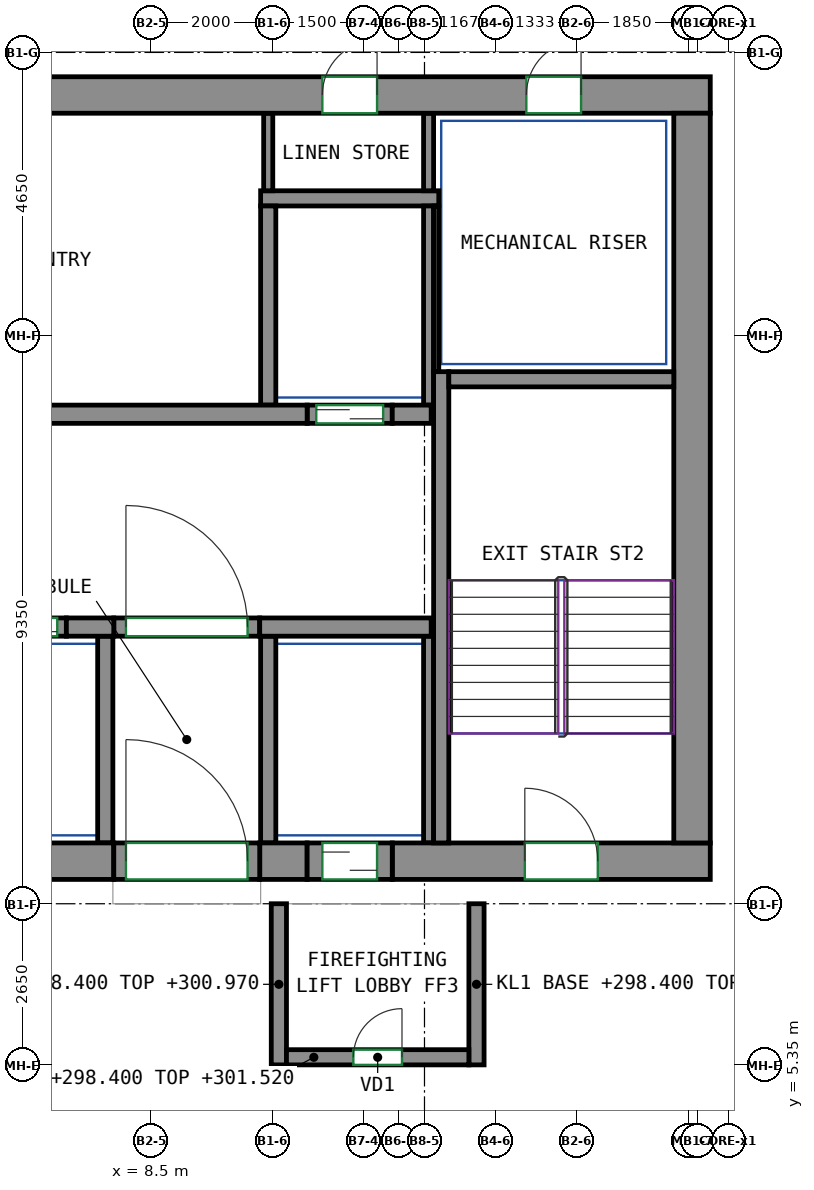
"""IFC4 building model, lengths in metres.
Left out: names, types, materials, properties, quantities, classifications, styles, units other than length and angle.
Written with IfcOpenShell. Run it as: python <this file> out.ifc"""

import sys

from ifc_helpers import new_model, si_unit, direction, frame, frame_2d, origin, place, context, subcontext, project, spatial, rectangle, extrude, source, transform, mapped, element, fill, save


model = new_model("IFC4")
c1 = context("Model", 3, precision=1e-05, world=origin(), true_north=direction((0.0, 1.0)))
c2 = subcontext(c1, "Body", "Model", "MODEL_VIEW")
j1 = project(units=[si_unit("LENGTHUNIT", "METRE"), si_unit("PLANEANGLEUNIT", "RADIAN")], contexts=[c1])
p1 = place(None, origin())
s1 = spatial("IfcSite", under=j1, at=p1, CompositionType="ELEMENT")
p2 = place(p1, origin())
s2 = spatial("IfcBuilding", under=s1, at=p2, CompositionType="ELEMENT")
p3 = place(p2, frame((0.0, 0.0, 298.4)))
s3 = spatial("IfcBuildingStorey", under=s2, at=p3, CompositionType="ELEMENT", Elevation=298.4)
m1 = source(origin(), c2, "Body", "SweptSolid", [
    extrude(rectangle(XDim=14.18, YDim=0.6, at=frame_2d((7.09, 0.0))), origin(), (0.0, 0.0, 1.0), 3.12),
])
p4 = place(p3, frame((-6.29, 8.7, 0.0), z_axis=(0.0, 0.0, 1.0), x_axis=(1.0, 0.0, 0.0)))
e1 = element("IfcWall", 1, at=p4, inside=s3, PredefinedType="SHEAR", context=c2, shape_type="MappedRepresentation", body=[
    mapped(m1, transform((0.0, 0.0, 0.0))),
])
m2 = source(origin(), c2, "Body", "SweptSolid", [
    extrude(rectangle(XDim=0.78, YDim=0.6, at=frame_2d((0.39, 0.0))), origin(), (0.0, 0.0, 1.0), 3.12),
])
p5 = place(p3, frame((10.29, 8.7, 0.0), z_axis=(0.0, 0.0, 1.0), x_axis=(1.0, 0.0, 0.0)))
e2 = element("IfcWall", 2, at=p5, inside=s3, PredefinedType="SHEAR", context=c2, shape_type="MappedRepresentation", body=[
    mapped(m2, transform((0.0, 0.0, 0.0))),
])
m3 = source(origin(), c2, "Body", "SweptSolid", [
    extrude(rectangle(XDim=5.23, YDim=0.6, at=frame_2d((2.615, 0.0))), origin(), (0.0, 0.0, 1.0), 3.12),
])
p6 = place(p3, frame((12.47, 8.7, 0.0), z_axis=(0.0, 0.0, 1.0), x_axis=(1.0, 0.0, 0.0)))
e3 = element("IfcWall", 3, at=p6, inside=s3, PredefinedType="SHEAR", context=c2, shape_type="MappedRepresentation", body=[
    mapped(m3, transform((0.0, 0.0, 0.0))),
])
p7 = place(p6, frame((2.18, 0.0, 0.0)))
e4 = element("IfcOpeningElement", 4, at=p7, cuts=e3, PredefinedType="OPENING", context=c2, shape_type="SweptSolid", body=[
    extrude(rectangle(XDim=1.2, YDim=2.1, at=frame_2d((0.6, 1.05))), frame((0.0, 0.31, 0.0), z_axis=(0.0, -1.0, 0.0), x_axis=(1.0, 0.0, 0.0)), (0.0, 0.0, 1.0), 0.62),
])
m4 = source(origin(), c2, "Body", "SweptSolid", [
    extrude(rectangle(XDim=33.3, YDim=0.6, at=frame_2d((16.65, 0.0))), origin(), (0.0, 0.0, 1.0), 3.12),
])
p8 = place(p3, frame((-15.6, 21.3, 0.0), z_axis=(0.0, 0.0, 1.0), x_axis=(1.0, 0.0, 0.0)))
e5 = element("IfcWall", 5, at=p8, inside=s3, PredefinedType="SHEAR", context=c2, shape_type="MappedRepresentation", body=[
    mapped(m4, transform((0.0, 0.0, 0.0))),
])
p9 = place(p8, frame((5.708, 0.0, 0.0)))
e6 = element("IfcOpeningElement", 6, at=p9, cuts=e5, PredefinedType="OPENING", context=c2, shape_type="SweptSolid", body=[
    extrude(rectangle(XDim=0.9, YDim=2.1, at=frame_2d((0.45, 1.05))), frame((0.0, 0.31, 0.0), z_axis=(0.0, -1.0, 0.0), x_axis=(1.0, 0.0, 0.0)), (0.0, 0.0, 1.0), 0.62),
])
p10 = place(p8, frame((10.773, 0.0, 0.0)))
e7 = element("IfcOpeningElement", 7, at=p10, cuts=e5, PredefinedType="OPENING", context=c2, shape_type="SweptSolid", body=[
    extrude(rectangle(XDim=0.9, YDim=2.1, at=frame_2d((0.45, 1.05))), frame((0.0, 0.31, 0.0), z_axis=(0.0, -1.0, 0.0), x_axis=(1.0, 0.0, 0.0)), (0.0, 0.0, 1.0), 0.62),
])
p11 = place(p8, frame((15.838, 0.0, 0.0)))
e8 = element("IfcOpeningElement", 8, at=p11, cuts=e5, PredefinedType="OPENING", context=c2, shape_type="SweptSolid", body=[
    extrude(rectangle(XDim=0.9, YDim=2.1, at=frame_2d((0.45, 1.05))), frame((0.0, 0.31, 0.0), z_axis=(0.0, -1.0, 0.0), x_axis=(1.0, 0.0, 0.0)), (0.0, 0.0, 1.0), 0.62),
])
p12 = place(p8, frame((21.493, 0.0, 0.0)))
e9 = element("IfcOpeningElement", 9, at=p12, cuts=e5, PredefinedType="OPENING", context=c2, shape_type="SweptSolid", body=[
    extrude(rectangle(XDim=0.9, YDim=2.1, at=frame_2d((0.45, 1.05))), frame((0.0, 0.31, 0.0), z_axis=(0.0, -1.0, 0.0), x_axis=(1.0, 0.0, 0.0)), (0.0, 0.0, 1.0), 0.62),
])
p13 = place(p8, frame((26.92, 0.0, 0.0)))
e10 = element("IfcOpeningElement", 10, at=p13, cuts=e5, PredefinedType="OPENING", context=c2, shape_type="SweptSolid", body=[
    extrude(rectangle(XDim=0.9, YDim=2.1, at=frame_2d((0.45, 1.05))), frame((0.0, 0.31, 0.0), z_axis=(0.0, -1.0, 0.0), x_axis=(1.0, 0.0, 0.0)), (0.0, 0.0, 1.0), 0.62),
])
p14 = place(p8, frame((2.125, 0.0, 0.0)))
e11 = element("IfcOpeningElement", 11, at=p14, cuts=e5, PredefinedType="OPENING", context=c2, shape_type="SweptSolid", body=[
    extrude(rectangle(XDim=0.9, YDim=2.1, at=frame_2d((0.45, 1.05))), frame((0.0, 0.31, 0.0), z_axis=(0.0, -1.0, 0.0), x_axis=(1.0, 0.0, 0.0)), (0.0, 0.0, 1.0), 0.62),
])
p15 = place(p8, frame((30.275, 0.0, 0.0)))
e12 = element("IfcOpeningElement", 12, at=p15, cuts=e5, PredefinedType="OPENING", context=c2, shape_type="SweptSolid", body=[
    extrude(rectangle(XDim=0.9, YDim=2.1, at=frame_2d((0.45, 1.05))), frame((0.0, 0.31, 0.0), z_axis=(0.0, -1.0, 0.0), x_axis=(1.0, 0.0, 0.0)), (0.0, 0.0, 1.0), 0.62),
])
m5 = source(origin(), c2, "Body", "SweptSolid", [
    extrude(rectangle(XDim=12.0, YDim=0.6, at=frame_2d((6.0, 0.0))), origin(), (0.0, 0.0, 1.0), 3.12),
])
p16 = place(p3, frame((17.4, 9.0, 0.0), z_axis=(0.0, 0.0, 1.0), x_axis=(0.0, 1.0, 0.0)))
e13 = element("IfcWall", 13, at=p16, inside=s3, PredefinedType="SHEAR", context=c2, shape_type="MappedRepresentation", body=[
    mapped(m5, transform((0.0, 0.0, 0.0))),
])
m6 = source(origin(), c2, "Body", "SweptSolid", [
    extrude(rectangle(XDim=7.75, YDim=0.25, at=frame_2d((3.875, 0.0))), origin(), (0.0, 0.0, 1.0), 3.12),
])
p17 = place(p3, frame((13.275, 9.0, 0.0), z_axis=(0.0, 0.0, 1.0), x_axis=(0.0, 1.0, 0.0)))
e14 = element("IfcWall", 14, at=p17, inside=s3, PredefinedType="SHEAR", context=c2, shape_type="MappedRepresentation", body=[
    mapped(m6, transform((0.0, 0.0, 0.0))),
])
m7 = source(origin(), c2, "Body", "SweptSolid", [
    extrude(rectangle(XDim=3.7, YDim=0.25, at=frame_2d((1.85, 0.0))), origin(), (0.0, 0.0, 1.0), 3.12),
])
p18 = place(p3, frame((13.4, 16.625, 0.0), z_axis=(0.0, 0.0, 1.0), x_axis=(1.0, 0.0, 0.0)))
e15 = element("IfcWall", 15, at=p18, inside=s3, PredefinedType="SHEAR", context=c2, shape_type="MappedRepresentation", body=[
    mapped(m7, transform((0.0, 0.0, 0.0))),
])
m8 = source(origin(), c2, "Body", "SweptSolid", [
    extrude(rectangle(XDim=0.78, YDim=0.3, at=frame_2d((0.39, 0.0))), origin(), (0.0, 0.0, 1.0), 3.12),
])
p19 = place(p3, frame((7.11, 12.55, 0.0), z_axis=(0.0, 0.0, 1.0), x_axis=(1.0, 0.0, 0.0)))
e16 = element("IfcWall", 16, at=p19, inside=s3, PredefinedType="SHEAR", context=c2, shape_type="MappedRepresentation", body=[
    mapped(m8, transform((0.0, 0.0, 0.0))),
])
m9 = source(origin(), c2, "Body", "SweptSolid", [
    extrude(rectangle(XDim=2.82, YDim=0.3, at=frame_2d((1.41, 0.0))), origin(), (0.0, 0.0, 1.0), 3.12),
])
p20 = place(p3, frame((10.29, 12.55, 0.0), z_axis=(0.0, 0.0, 1.0), x_axis=(1.0, 0.0, 0.0)))
e17 = element("IfcWall", 17, at=p20, inside=s3, PredefinedType="SHEAR", context=c2, shape_type="MappedRepresentation", body=[
    mapped(m9, transform((0.0, 0.0, 0.0))),
])
m10 = source(origin(), c2, "Body", "SweptSolid", [
    extrude(rectangle(XDim=22.08, YDim=0.3, at=frame_2d((11.04, 0.0))), origin(), (0.0, 0.0, 1.0), 3.12),
])
p21 = place(p3, frame((-11.01, 16.05, 0.0), z_axis=(0.0, 0.0, 1.0), x_axis=(1.0, 0.0, 0.0)))
e18 = element("IfcWall", 18, at=p21, inside=s3, PredefinedType="SHEAR", context=c2, shape_type="MappedRepresentation", body=[
    mapped(m10, transform((0.0, 0.0, 0.0))),
])
m11 = source(origin(), c2, "Body", "SweptSolid", [
    extrude(rectangle(XDim=0.64, YDim=0.3, at=frame_2d((0.32, 0.0))), origin(), (0.0, 0.0, 1.0), 3.12),
])
p22 = place(p3, frame((12.47, 16.05, 0.0), z_axis=(0.0, 0.0, 1.0), x_axis=(1.0, 0.0, 0.0)))
e19 = element("IfcWall", 19, at=p22, inside=s3, PredefinedType="SHEAR", context=c2, shape_type="MappedRepresentation", body=[
    mapped(m11, transform((0.0, 0.0, 0.0))),
])
m12 = source(origin(), c2, "Body", "SweptSolid", [
    extrude(rectangle(XDim=1.4, YDim=0.3, at=frame_2d((0.7, 0.0))), origin(), (0.0, 0.0, 1.0), 3.12),
])
p23 = place(p3, frame((5.71, 12.55, 0.0), z_axis=(0.0, 0.0, 1.0), x_axis=(1.0, 0.0, 0.0)))
e20 = element("IfcWall", 20, at=p23, inside=s3, PredefinedType="PARTITIONING", context=c2, shape_type="MappedRepresentation", body=[
    mapped(m12, transform((0.0, 0.0, 0.0))),
])
p24 = place(p23, frame((0.15, 0.0, 0.0)))
e21 = element("IfcOpeningElement", 21, at=p24, cuts=e20, PredefinedType="OPENING", context=c2, shape_type="SweptSolid", body=[
    extrude(rectangle(XDim=1.1, YDim=2.1, at=frame_2d((0.55, 1.05))), frame((0.0, 0.16, 0.0), z_axis=(0.0, -1.0, 0.0), x_axis=(1.0, 0.0, 0.0)), (0.0, 0.0, 1.0), 0.32),
])
m13 = source(origin(), c2, "Body", "SweptSolid", [
    extrude(rectangle(XDim=1.4, YDim=0.3, at=frame_2d((0.7, 0.0))), origin(), (0.0, 0.0, 1.0), 3.12),
])
p25 = place(p3, frame((11.07, 16.05, 0.0), z_axis=(0.0, 0.0, 1.0), x_axis=(1.0, 0.0, 0.0)))
e22 = element("IfcWall", 22, at=p25, inside=s3, PredefinedType="PARTITIONING", context=c2, shape_type="MappedRepresentation", body=[
    mapped(m13, transform((0.0, 0.0, 0.0))),
])
p26 = place(p25, frame((0.15, 0.0, 0.0)))
e23 = element("IfcOpeningElement", 23, at=p26, cuts=e22, PredefinedType="OPENING", context=c2, shape_type="SweptSolid", body=[
    extrude(rectangle(XDim=1.1, YDim=2.1, at=frame_2d((0.55, 1.05))), frame((0.0, 0.16, 0.0), z_axis=(0.0, -1.0, 0.0), x_axis=(1.0, 0.0, 0.0)), (0.0, 0.0, 1.0), 0.32),
])
m14 = source(origin(), c2, "Body", "SweptSolid", [
    extrude(rectangle(XDim=2.4, YDim=0.3, at=frame_2d((1.2, 0.0))), origin(), (0.0, 0.0, 1.0), 3.12),
])
p27 = place(p3, frame((7.89, 12.55, 0.0), z_axis=(0.0, 0.0, 1.0), x_axis=(1.0, 0.0, 0.0)))
e24 = element("IfcWall", 24, at=p27, inside=s3, PredefinedType="PARTITIONING", context=c2, shape_type="MappedRepresentation", body=[
    mapped(m14, transform((0.0, 0.0, 0.0))),
])
p28 = place(p27, frame((0.2, 0.0, 0.0)))
e25 = element("IfcOpeningElement", 25, at=p28, cuts=e24, PredefinedType="OPENING", context=c2, shape_type="SweptSolid", body=[
    extrude(rectangle(XDim=2.0, YDim=2.1, at=frame_2d((1.0, 1.05))), frame((0.0, 0.16, 0.0), z_axis=(0.0, -1.0, 0.0), x_axis=(1.0, 0.0, 0.0)), (0.0, 0.0, 1.0), 0.32),
])
m15 = source(origin(), c2, "Body", "SweptSolid", [
    extrude(rectangle(XDim=2.65, YDim=0.25, at=frame_2d((1.325, 0.0))), origin(), (0.0, 0.0, 1.0), 2.57),
])
for number, where, z_axis, x_axis in (
    (26, (10.605, 5.35, 0.0), (0.0, 0.0, 1.0), (0.0, 1.0, 0.0)),
    (27, (13.855, 5.35, 0.0), (0.0, 0.0, 1.0), (0.0, 1.0, 0.0)),
):
    element("IfcWall", number, at=place(p3, frame(where, z_axis=z_axis, x_axis=x_axis)), inside=s3, PredefinedType="PARTITIONING", context=c2, shape_type="MappedRepresentation", body=[
        mapped(m15, transform((0.0, 0.0, 0.0))),
    ])
m16 = source(origin(), c2, "Body", "SweptSolid", [
    extrude(rectangle(XDim=3.0, YDim=0.25, at=frame_2d((1.5, 0.0))), origin(), (0.0, 0.0, 1.0), 3.12),
])
p29 = place(p3, frame((10.73, 5.475, 0.0), z_axis=(0.0, 0.0, 1.0), x_axis=(1.0, 0.0, 0.0)))
e28 = element("IfcWall", 28, at=p29, inside=s3, PredefinedType="PARTITIONING", context=c2, shape_type="MappedRepresentation", body=[
    mapped(m16, transform((0.0, 0.0, 0.0))),
])
p30 = place(p29, frame((1.1, 0.0, 0.0)))
e29 = element("IfcOpeningElement", 29, at=p30, cuts=e28, PredefinedType="OPENING", context=c2, shape_type="SweptSolid", body=[
    extrude(rectangle(XDim=0.8, YDim=2.0, at=frame_2d((0.4, 1.0))), frame((0.0, 0.135, 0.0), z_axis=(0.0, -1.0, 0.0), x_axis=(1.0, 0.0, 0.0)), (0.0, 0.0, 1.0), 0.27),
])
m17 = source(origin(), c2, "Body", "SweptSolid", [
    extrude(rectangle(XDim=2.93, YDim=0.25, at=frame_2d((1.465, 0.0))), origin(), (0.0, 0.0, 1.0), 3.12),
])
p31 = place(p3, frame((10.305, 19.6, 0.0), z_axis=(0.0, 0.0, 1.0), x_axis=(1.0, 0.0, 0.0)))
e30 = element("IfcWall", 30, at=p31, inside=s3, PredefinedType="PARTITIONING", context=c2, shape_type="MappedRepresentation", body=[
    mapped(m17, transform((0.0, 0.0, 0.0))),
])
m18 = source(origin(), c2, "Body", "SweptSolid", [
    extrude(rectangle(XDim=3.275, YDim=0.165, at=frame_2d((1.638, 0.0))), origin(), (0.0, 0.0, 1.0), 3.12),
])
p32 = place(p3, frame((13.067, 16.2, 0.0), z_axis=(0.0, 0.0, 1.0), x_axis=(0.0, 1.0, 0.0)))
e31 = element("IfcWall", 31, at=p32, inside=s3, PredefinedType="PARTITIONING", context=c2, shape_type="MappedRepresentation", body=[
    mapped(m18, transform((0.0, 0.0, 0.0))),
])
m19 = source(origin(), c2, "Body", "SweptSolid", [
    extrude(rectangle(XDim=1.275, YDim=0.165, at=frame_2d((0.637, 0.0))), origin(), (0.0, 0.0, 1.0), 3.12),
])
p33 = place(p3, frame((13.067, 19.725, 0.0), z_axis=(0.0, 0.0, 1.0), x_axis=(0.0, 1.0, 0.0)))
e32 = element("IfcWall", 32, at=p33, inside=s3, PredefinedType="PARTITIONING", context=c2, shape_type="MappedRepresentation", body=[
    mapped(m19, transform((0.0, 0.0, 0.0))),
])
m20 = source(origin(), c2, "Body", "SweptSolid", [
    extrude(rectangle(XDim=3.275, YDim=0.25, at=frame_2d((1.638, 0.0))), origin(), (0.0, 0.0, 1.0), 3.12),
])
p34 = place(p3, frame((10.43, 16.2, 0.0), z_axis=(0.0, 0.0, 1.0), x_axis=(0.0, 1.0, 0.0)))
e33 = element("IfcWall", 33, at=p34, inside=s3, PredefinedType="PARTITIONING", context=c2, shape_type="MappedRepresentation", body=[
    mapped(m20, transform((0.0, 0.0, 0.0))),
])
m21 = source(origin(), c2, "Body", "SweptSolid", [
    extrude(rectangle(XDim=2.725, YDim=0.085, at=frame_2d((1.363, 0.0))), origin(), (0.0, 0.0, 1.0), 3.12),
])
p35 = place(p3, frame((13.192, 16.75, 0.0), z_axis=(0.0, 0.0, 1.0), x_axis=(0.0, 1.0, 0.0)))
e34 = element("IfcWall", 34, at=p35, inside=s3, PredefinedType="PARTITIONING", context=c2, shape_type="MappedRepresentation", body=[
    mapped(m21, transform((0.0, 0.0, 0.0))),
])
m22 = source(origin(), c2, "Body", "SweptSolid", [
    extrude(rectangle(XDim=3.4, YDim=0.25, at=frame_2d((1.7, 0.0))), origin(), (0.0, 0.0, 1.0), 3.12),
])
p36 = place(p3, frame((10.43, 9.0, 0.0), z_axis=(0.0, 0.0, 1.0), x_axis=(0.0, 1.0, 0.0)))
e35 = element("IfcWall", 35, at=p36, inside=s3, PredefinedType="PARTITIONING", context=c2, shape_type="MappedRepresentation", body=[
    mapped(m22, transform((0.0, 0.0, 0.0))),
])
m23 = source(origin(), c2, "Body", "SweptSolid", [
    extrude(rectangle(XDim=3.4, YDim=0.165, at=frame_2d((1.7, 0.0))), origin(), (0.0, 0.0, 1.0), 3.12),
])
p37 = place(p3, frame((13.067, 9.0, 0.0), z_axis=(0.0, 0.0, 1.0), x_axis=(0.0, 1.0, 0.0)))
e36 = element("IfcWall", 36, at=p37, inside=s3, PredefinedType="PARTITIONING", context=c2, shape_type="MappedRepresentation", body=[
    mapped(m23, transform((0.0, 0.0, 0.0))),
])
p38 = place(p3, frame((7.75, 9.0, 0.0), z_axis=(0.0, 0.0, 1.0), x_axis=(0.0, 1.0, 0.0)))
e37 = element("IfcWall", 37, at=p38, inside=s3, PredefinedType="PARTITIONING", context=c2, shape_type="MappedRepresentation", body=[
    mapped(m22, transform((0.0, 0.0, 0.0))),
])
m24 = source(origin(), c2, "Body", "SweptSolid", [
    extrude(rectangle(XDim=1.275, YDim=0.15, at=frame_2d((0.637, 0.0))), origin(), (0.0, 0.0, 1.0), 3.12),
])
p39 = place(p3, frame((10.43, 19.725, 0.0), z_axis=(0.0, 0.0, 1.0), x_axis=(0.0, 1.0, 0.0)))
e38 = element("IfcWall", 38, at=p39, inside=s3, PredefinedType="PARTITIONING", context=c2, shape_type="MappedRepresentation", body=[
    mapped(m24, transform((0.0, 0.0, 0.0))),
])
m25 = source(origin(), c2, "Body", "SweptSolid", [
    extrude(rectangle(XDim=2.4, YDim=0.6, at=frame_2d((1.2, 0.0))), origin(), (0.0, 0.0, 1.0), 2.7),
])
p40 = place(p3, frame((7.89, 8.7, 0.0), z_axis=(0.0, 0.0, 1.0), x_axis=(1.0, 0.0, 0.0)))
e39 = element("IfcWall", 39, at=p40, inside=s3, PredefinedType="PARTITIONING", context=c2, shape_type="MappedRepresentation", body=[
    mapped(m25, transform((0.0, 0.0, 0.0))),
])
p41 = place(p40, frame((0.2, 0.0, 0.0)))
e40 = element("IfcOpeningElement", 40, at=p41, cuts=e39, PredefinedType="OPENING", context=c2, shape_type="SweptSolid", body=[
    extrude(rectangle(XDim=2.0, YDim=2.1, at=frame_2d((1.0, 1.05))), frame((0.0, 0.31, 0.0), z_axis=(0.0, -1.0, 0.0), x_axis=(1.0, 0.0, 0.0)), (0.0, 0.0, 1.0), 0.62),
])
m26 = source(origin(), c2, "Body", "SweptSolid", [
    extrude(rectangle(XDim=1.4, YDim=0.6, at=frame_2d((0.7, 0.0))), origin(), (0.0, 0.0, 1.0), 2.7),
])
p42 = place(p3, frame((11.07, 8.7, 0.0), z_axis=(0.0, 0.0, 1.0), x_axis=(1.0, 0.0, 0.0)))
e41 = element("IfcWall", 41, at=p42, inside=s3, PredefinedType="PARTITIONING", context=c2, shape_type="MappedRepresentation", body=[
    mapped(m26, transform((0.0, 0.0, 0.0))),
])
p43 = place(p42, frame((0.25, 0.0, 0.0)))
e42 = element("IfcOpeningElement", 42, at=p43, cuts=e41, PredefinedType="OPENING", context=c2, shape_type="SweptSolid", body=[
    extrude(rectangle(XDim=0.9, YDim=2.1, at=frame_2d((0.45, 1.05))), frame((0.0, 0.31, 0.0), z_axis=(0.0, -1.0, 0.0), x_axis=(1.0, 0.0, 0.0)), (0.0, 0.0, 1.0), 0.62),
])
p44 = place(p28, origin())
e43 = element("IfcDoor", 43, at=p44, inside=s3, OperationType="DOUBLE_DOOR_SINGLE_SWING", PredefinedType="DOOR", context=c2, shape_type="SweptSolid", body=[
    extrude(rectangle(XDim=2.0, YDim=2.1, at=frame_2d((1.0, 1.05))), frame((0.0, 0.025, 0.0), z_axis=(0.0, -1.0, 0.0), x_axis=(1.0, 0.0, 0.0)), (0.0, 0.0, 1.0), 0.05),
])
fill(e25, e43)
p45 = place(p41, origin())
e44 = element("IfcDoor", 44, at=p45, inside=s3, OperationType="DOUBLE_DOOR_SINGLE_SWING", PredefinedType="DOOR", context=c2, shape_type="SweptSolid", body=[
    extrude(rectangle(XDim=2.0, YDim=2.1, at=frame_2d((1.0, 1.05))), frame((0.0, 0.205, 0.0), z_axis=(0.0, -1.0, 0.0), x_axis=(1.0, 0.0, 0.0)), (0.0, 0.0, 1.0), 0.05),
])
fill(e40, e44)
p46 = place(p30, origin())
e45 = element("IfcDoor", 45, at=p46, inside=s3, OperationType="SINGLE_SWING_RIGHT", PredefinedType="DOOR", context=c2, shape_type="SweptSolid", body=[
    extrude(rectangle(XDim=0.8, YDim=2.0, at=frame_2d((0.4, 1.0))), frame((0.0, 0.025, 0.0), z_axis=(0.0, -1.0, 0.0), x_axis=(1.0, 0.0, 0.0)), (0.0, 0.0, 1.0), 0.05),
])
fill(e29, e45)
p47 = place(p43, origin())
e46 = element("IfcDoor", 46, at=p47, inside=s3, OperationType="SLIDING_TO_LEFT", PredefinedType="DOOR", context=c2, shape_type="SweptSolid", body=[
    extrude(rectangle(XDim=0.9, YDim=2.1, at=frame_2d((0.45, 1.05))), frame((0.0, 0.205, 0.0), z_axis=(0.0, -1.0, 0.0), x_axis=(1.0, 0.0, 0.0)), (0.0, 0.0, 1.0), 0.05),
])
fill(e42, e46)
p48 = place(p24, origin())
e47 = element("IfcDoor", 47, at=p48, inside=s3, OperationType="DOUBLE_DOOR_SLIDING", PredefinedType="DOOR", context=c2, shape_type="SweptSolid", body=[
    extrude(rectangle(XDim=1.1, YDim=2.1, at=frame_2d((0.55, 1.05))), frame((0.0, 0.025, 0.0), z_axis=(0.0, -1.0, 0.0), x_axis=(1.0, 0.0, 0.0)), (0.0, 0.0, 1.0), 0.05),
])
fill(e21, e47)
p49 = place(p26, origin())
e48 = element("IfcDoor", 48, at=p49, inside=s3, OperationType="DOUBLE_DOOR_SLIDING", PredefinedType="DOOR", context=c2, shape_type="SweptSolid", body=[
    extrude(rectangle(XDim=1.1, YDim=2.1, at=frame_2d((0.55, 1.05))), frame((0.0, 0.025, 0.0), z_axis=(0.0, -1.0, 0.0), x_axis=(1.0, 0.0, 0.0)), (0.0, 0.0, 1.0), 0.05),
])
fill(e23, e48)
p50 = place(p13, origin())
e49 = element("IfcDoor", 49, at=p50, inside=s3, OperationType="SINGLE_SWING_RIGHT", PredefinedType="DOOR", context=c2, shape_type="SweptSolid", body=[
    extrude(rectangle(XDim=0.9, YDim=2.1, at=frame_2d((0.45, 1.05))), frame((0.0, -0.155, 0.0), z_axis=(0.0, -1.0, 0.0), x_axis=(1.0, 0.0, 0.0)), (0.0, 0.0, 1.0), 0.05),
])
fill(e10, e49)
p51 = place(p15, origin())
e50 = element("IfcDoor", 50, at=p51, inside=s3, OperationType="SINGLE_SWING_RIGHT", PredefinedType="DOOR", context=c2, shape_type="SweptSolid", body=[
    extrude(rectangle(XDim=0.9, YDim=2.1, at=frame_2d((0.45, 1.05))), frame((0.0, -0.155, 0.0), z_axis=(0.0, -1.0, 0.0), x_axis=(1.0, 0.0, 0.0)), (0.0, 0.0, 1.0), 0.05),
])
fill(e12, e50)
p52 = place(p7, origin())
e51 = element("IfcDoor", 51, at=p52, inside=s3, OperationType="DOUBLE_DOOR_SINGLE_SWING", PredefinedType="DOOR", context=c2, shape_type="SweptSolid", body=[
    extrude(rectangle(XDim=1.2, YDim=2.1, at=frame_2d((0.6, 1.05))), frame((0.0, 0.205, 0.0), z_axis=(0.0, -1.0, 0.0), x_axis=(1.0, 0.0, 0.0)), (0.0, 0.0, 1.0), 0.05),
])
fill(e4, e51)
save(model, sys.argv[1])
